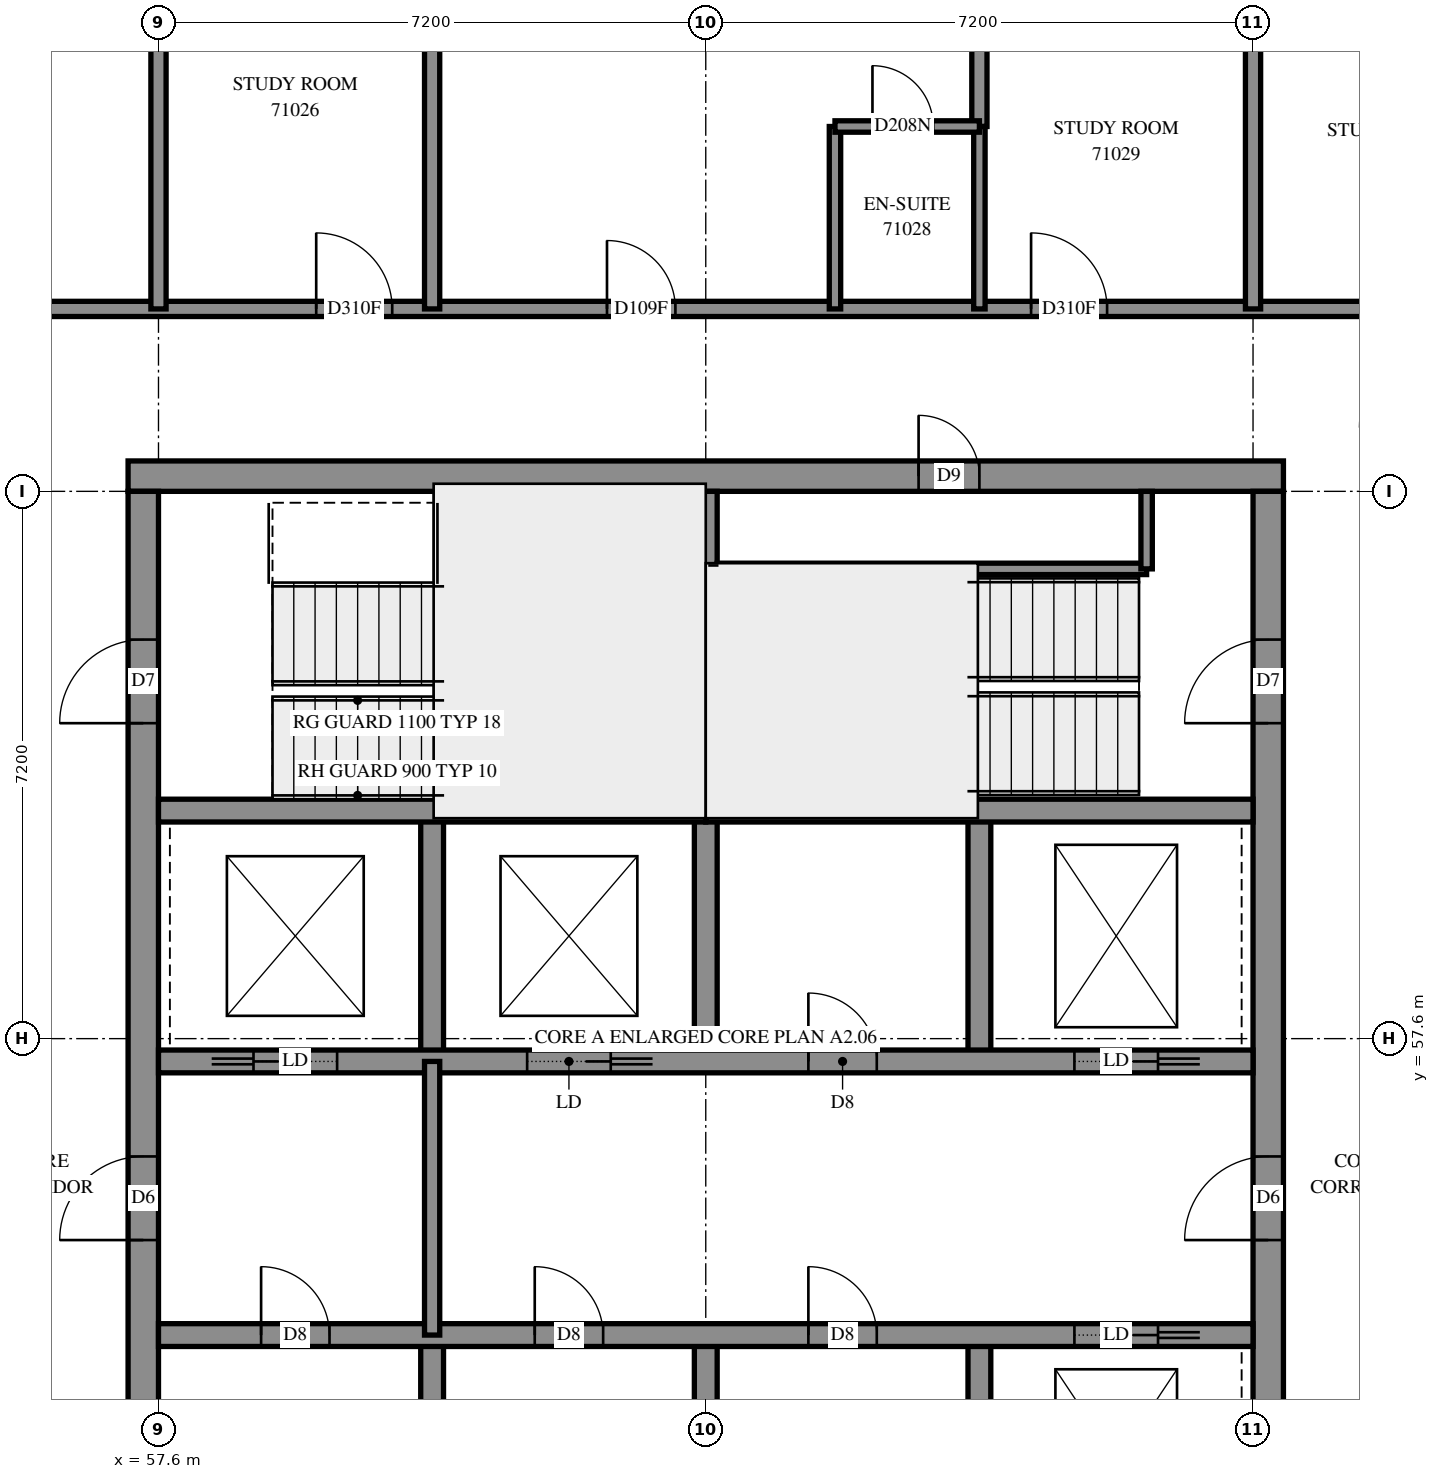
"""IFC4 building model, lengths in metres.
Left out: names, types, materials, properties, quantities, classifications, styles, units other than length and angle.
Written with IfcOpenShell. Run it as: python <this file> out.ifc"""

import sys

from ifc_helpers import new_model, si_unit, direction, frame, frame_2d, origin, place, context, subcontext, project, spatial, rectangle, extrude, element, fill, save


model = new_model("IFC4")
c1 = context("Model", 3, precision=1e-05, world=origin(), true_north=direction((0.0, 1.0)))
c2 = subcontext(c1, "Body", "Model", "MODEL_VIEW")
j1 = project(units=[si_unit("LENGTHUNIT", "METRE"), si_unit("PLANEANGLEUNIT", "RADIAN")], contexts=[c1])
p1 = place(None, origin())
s1 = spatial("IfcSite", under=j1, at=p1, CompositionType="ELEMENT")
p2 = place(p1, origin())
s2 = spatial("IfcBuilding", under=s1, at=p2, CompositionType="ELEMENT")
p3 = place(p2, frame((0.0, 0.0, 260.8)))
s3 = spatial("IfcBuildingStorey", under=s2, at=p3, CompositionType="ELEMENT", Elevation=260.8)
p4 = place(p3, frame((57.2, 65.0, -0.3), z_axis=(0.0, 0.0, 1.0), x_axis=(1.0, 0.0, 0.0)))
e1 = element("IfcWall", 1, at=p4, inside=s3, PredefinedType="SHEAR", context=c2, shape_type="SweptSolid", body=[
    extrude(rectangle(XDim=15.2, YDim=0.4, at=frame_2d((7.6, 0.0))), origin(), (0.0, 0.0, 1.0), 2.7),
])
p5 = place(p4, frame((10.4, 0.0, 0.3)))
e2 = element("IfcOpeningElement", 2, at=p5, cuts=e1, PredefinedType="OPENING", context=c2, shape_type="SweptSolid", body=[
    extrude(rectangle(XDim=0.8, YDim=2.1, at=frame_2d((0.4, 1.05))), frame((0.0, 0.21, 0.0), z_axis=(0.0, -1.0, 0.0), x_axis=(1.0, 0.0, 0.0)), (0.0, 0.0, 1.0), 0.42),
])
p6 = place(p3, frame((57.4, 50.4, -0.3), z_axis=(0.0, 0.0, 1.0), x_axis=(0.0, 1.0, 0.0)))
e3 = element("IfcWall", 3, at=p6, inside=s3, PredefinedType="SHEAR", context=c2, shape_type="SweptSolid", body=[
    extrude(rectangle(XDim=14.4, YDim=0.4, at=frame_2d((7.2, 0.0))), origin(), (0.0, 0.0, 1.0), 2.7),
])
p7 = place(p6, frame((4.55, 0.0, 0.3)))
e4 = element("IfcOpeningElement", 4, at=p7, cuts=e3, PredefinedType="OPENING", context=c2, shape_type="SweptSolid", body=[
    extrude(rectangle(XDim=1.1, YDim=2.1, at=frame_2d((0.55, 1.05))), frame((0.0, 0.21, 0.0), z_axis=(0.0, -1.0, 0.0), x_axis=(1.0, 0.0, 0.0)), (0.0, 0.0, 1.0), 0.42),
])
p8 = place(p6, frame((11.35, 0.0, 0.3)))
e5 = element("IfcOpeningElement", 5, at=p8, cuts=e3, PredefinedType="OPENING", context=c2, shape_type="SweptSolid", body=[
    extrude(rectangle(XDim=1.1, YDim=2.1, at=frame_2d((0.55, 1.05))), frame((0.0, 0.21, 0.0), z_axis=(0.0, -1.0, 0.0), x_axis=(1.0, 0.0, 0.0)), (0.0, 0.0, 1.0), 0.42),
])
p9 = place(p3, frame((72.2, 50.4, -0.3), z_axis=(0.0, 0.0, 1.0), x_axis=(0.0, 1.0, 0.0)))
e6 = element("IfcWall", 6, at=p9, inside=s3, PredefinedType="SHEAR", context=c2, shape_type="SweptSolid", body=[
    extrude(rectangle(XDim=14.4, YDim=0.4, at=frame_2d((7.2, 0.0))), origin(), (0.0, 0.0, 1.0), 2.7),
])
p10 = place(p9, frame((4.55, 0.0, 0.3)))
e7 = element("IfcOpeningElement", 7, at=p10, cuts=e6, PredefinedType="OPENING", context=c2, shape_type="SweptSolid", body=[
    extrude(rectangle(XDim=1.1, YDim=2.1, at=frame_2d((0.55, 1.05))), frame((0.0, 0.21, 0.0), z_axis=(0.0, -1.0, 0.0), x_axis=(1.0, 0.0, 0.0)), (0.0, 0.0, 1.0), 0.42),
])
p11 = place(p9, frame((11.35, 0.0, 0.3)))
e8 = element("IfcOpeningElement", 8, at=p11, cuts=e6, PredefinedType="OPENING", context=c2, shape_type="SweptSolid", body=[
    extrude(rectangle(XDim=1.1, YDim=2.1, at=frame_2d((0.55, 1.05))), frame((0.0, 0.21, 0.0), z_axis=(0.0, -1.0, 0.0), x_axis=(1.0, 0.0, 0.0)), (0.0, 0.0, 1.0), 0.42),
])
for number, where, z_axis, x_axis in (
    (9, (61.2, 50.4, 0.0), (0.0, 0.0, 1.0), (0.0, 1.0, 0.0)),
    (10, (61.2, 57.3, 0.0), (0.0, 0.0, 1.0), (0.0, 1.0, 0.0)),
    (11, (64.8, 50.4, 0.0), (0.0, 0.0, 1.0), (0.0, 1.0, 0.0)),
    (12, (64.8, 57.3, 0.0), (0.0, 0.0, 1.0), (0.0, 1.0, 0.0)),
    (13, (68.4, 50.4, 0.0), (0.0, 0.0, 1.0), (0.0, 1.0, 0.0)),
    (14, (68.4, 57.3, 0.0), (0.0, 0.0, 1.0), (0.0, 1.0, 0.0)),
):
    element("IfcWall", number, at=place(p3, frame(where, z_axis=z_axis, x_axis=x_axis)), inside=s3, PredefinedType="SOLIDWALL", context=c2, shape_type="SweptSolid", body=[
        extrude(rectangle(XDim=3.3, YDim=0.3, at=frame_2d((1.65, 0.0))), origin(), (0.0, 0.0, 1.0), 3.1),
    ])
p12 = place(p3, frame((57.6, 53.7, 0.0), z_axis=(0.0, 0.0, 1.0), x_axis=(1.0, 0.0, 0.0)))
e15 = element("IfcWall", 15, at=p12, inside=s3, PredefinedType="SOLIDWALL", context=c2, shape_type="SweptSolid", body=[
    extrude(rectangle(XDim=14.4, YDim=0.3, at=frame_2d((7.2, 0.0))), origin(), (0.0, 0.0, 1.0), 3.1),
])
p13 = place(p12, frame((1.35, 0.0, 0.0)))
e16 = element("IfcOpeningElement", 16, at=p13, cuts=e15, PredefinedType="OPENING", context=c2, shape_type="SweptSolid", body=[
    extrude(rectangle(XDim=0.9, YDim=2.1, at=frame_2d((0.45, 1.05))), frame((0.0, 0.16, 0.0), z_axis=(0.0, -1.0, 0.0), x_axis=(1.0, 0.0, 0.0)), (0.0, 0.0, 1.0), 0.32),
])
p14 = place(p12, frame((4.95, 0.0, 0.0)))
e17 = element("IfcOpeningElement", 17, at=p14, cuts=e15, PredefinedType="OPENING", context=c2, shape_type="SweptSolid", body=[
    extrude(rectangle(XDim=0.9, YDim=2.1, at=frame_2d((0.45, 1.05))), frame((0.0, 0.16, 0.0), z_axis=(0.0, -1.0, 0.0), x_axis=(1.0, 0.0, 0.0)), (0.0, 0.0, 1.0), 0.32),
])
p15 = place(p12, frame((8.55, 0.0, 0.0)))
e18 = element("IfcOpeningElement", 18, at=p15, cuts=e15, PredefinedType="OPENING", context=c2, shape_type="SweptSolid", body=[
    extrude(rectangle(XDim=0.9, YDim=2.1, at=frame_2d((0.45, 1.05))), frame((0.0, 0.16, 0.0), z_axis=(0.0, -1.0, 0.0), x_axis=(1.0, 0.0, 0.0)), (0.0, 0.0, 1.0), 0.32),
])
p16 = place(p12, frame((12.05, 0.0, 0.0)))
e19 = element("IfcOpeningElement", 19, at=p16, cuts=e15, PredefinedType="OPENING", context=c2, shape_type="SweptSolid", body=[
    extrude(rectangle(XDim=1.1, YDim=2.1, at=frame_2d((0.55, 1.05))), frame((0.0, 0.16, 0.0), z_axis=(0.0, -1.0, 0.0), x_axis=(1.0, 0.0, 0.0)), (0.0, 0.0, 1.0), 0.32),
])
p17 = place(p3, frame((57.6, 57.3, 0.0), z_axis=(0.0, 0.0, 1.0), x_axis=(1.0, 0.0, 0.0)))
e20 = element("IfcWall", 20, at=p17, inside=s3, PredefinedType="SOLIDWALL", context=c2, shape_type="SweptSolid", body=[
    extrude(rectangle(XDim=14.4, YDim=0.3, at=frame_2d((7.2, 0.0))), origin(), (0.0, 0.0, 1.0), 3.1),
])
p18 = place(p17, frame((8.55, 0.0, 0.0)))
e21 = element("IfcOpeningElement", 21, at=p18, cuts=e20, PredefinedType="OPENING", context=c2, shape_type="SweptSolid", body=[
    extrude(rectangle(XDim=0.9, YDim=2.1, at=frame_2d((0.45, 1.05))), frame((0.0, 0.16, 0.0), z_axis=(0.0, -1.0, 0.0), x_axis=(1.0, 0.0, 0.0)), (0.0, 0.0, 1.0), 0.32),
])
p19 = place(p17, frame((1.25, 0.0, 0.0)))
e22 = element("IfcOpeningElement", 22, at=p19, cuts=e20, PredefinedType="OPENING", context=c2, shape_type="SweptSolid", body=[
    extrude(rectangle(XDim=1.1, YDim=2.1, at=frame_2d((0.55, 1.05))), frame((0.0, 0.16, 0.0), z_axis=(0.0, -1.0, 0.0), x_axis=(1.0, 0.0, 0.0)), (0.0, 0.0, 1.0), 0.32),
])
p20 = place(p17, frame((4.85, 0.0, 0.0)))
e23 = element("IfcOpeningElement", 23, at=p20, cuts=e20, PredefinedType="OPENING", context=c2, shape_type="SweptSolid", body=[
    extrude(rectangle(XDim=1.1, YDim=2.1, at=frame_2d((0.55, 1.05))), frame((0.0, 0.16, 0.0), z_axis=(0.0, -1.0, 0.0), x_axis=(1.0, 0.0, 0.0)), (0.0, 0.0, 1.0), 0.32),
])
p21 = place(p17, frame((12.05, 0.0, 0.0)))
e24 = element("IfcOpeningElement", 24, at=p21, cuts=e20, PredefinedType="OPENING", context=c2, shape_type="SweptSolid", body=[
    extrude(rectangle(XDim=1.1, YDim=2.1, at=frame_2d((0.55, 1.05))), frame((0.0, 0.16, 0.0), z_axis=(0.0, -1.0, 0.0), x_axis=(1.0, 0.0, 0.0)), (0.0, 0.0, 1.0), 0.32),
])
for number, where, z_axis, x_axis in (
    (25, (57.6, 60.6, 0.0), (0.0, 0.0, 1.0), (1.0, 0.0, 0.0)),
    (26, (64.8, 60.6, 0.0), (0.0, 0.0, 1.0), (1.0, 0.0, 0.0)),
):
    element("IfcWall", number, at=place(p3, frame(where, z_axis=z_axis, x_axis=x_axis)), inside=s3, PredefinedType="SOLIDWALL", context=c2, shape_type="SweptSolid", body=[
        extrude(rectangle(XDim=7.2, YDim=0.3, at=frame_2d((3.6, 0.0))), origin(), (0.0, 0.0, 1.0), 3.1),
    ])
p22 = place(p3, frame((64.8, 60.6, 0.0), z_axis=(0.0, 0.0, 1.0), x_axis=(0.0, 1.0, 0.0)))
e27 = element("IfcWall", 27, at=p22, inside=s3, PredefinedType="SOLIDWALL", context=c2, shape_type="SweptSolid", body=[
    extrude(rectangle(XDim=4.2, YDim=0.3, at=frame_2d((2.1, 0.0))), origin(), (0.0, 0.0, 1.0), 3.1),
])
p23 = place(p3, frame((64.95, 63.78, 0.0), z_axis=(0.0, 0.0, 1.0), x_axis=(1.0, 0.0, 0.0)))
e28 = element("IfcWall", 28, at=p23, inside=s3, PredefinedType="PARTITIONING", context=c2, shape_type="SweptSolid", body=[
    extrude(rectangle(XDim=5.65, YDim=0.15, at=frame_2d((2.825, 0.0))), origin(), (0.0, 0.0, 1.0), 3.1),
])
p24 = place(p3, frame((70.6, 63.78, 0.0), z_axis=(0.0, 0.0, 1.0), x_axis=(0.0, 1.0, 0.0)))
e29 = element("IfcWall", 29, at=p24, inside=s3, PredefinedType="PARTITIONING", context=c2, shape_type="SweptSolid", body=[
    extrude(rectangle(XDim=1.02, YDim=0.15, at=frame_2d((0.51, 0.0))), origin(), (0.0, 0.0, 1.0), 3.1),
])
p25 = place(p3, frame((61.2, 53.7, 0.0), z_axis=(0.0, 0.0, 1.0), x_axis=(0.0, 1.0, 0.0)))
e30 = element("IfcWall", 30, at=p25, inside=s3, PredefinedType="PARTITIONING", context=c2, shape_type="SweptSolid", body=[
    extrude(rectangle(XDim=3.6, YDim=0.2, at=frame_2d((1.8, 0.0))), origin(), (0.0, 0.0, 1.0), 3.1),
])
p26 = place(p3, frame((55.2, 67.2, 0.0), z_axis=(0.0, 0.0, 1.0), x_axis=(1.0, 0.0, 0.0)))
e31 = element("IfcWall", 31, at=p26, inside=s3, PredefinedType="PARTITIONING", context=c2, shape_type="SweptSolid", body=[
    extrude(rectangle(XDim=19.2, YDim=0.2, at=frame_2d((9.6, 0.0))), origin(), (0.0, 0.0, 1.0), 3.1),
])
p27 = place(p26, frame((4.475, 0.0, 0.0)))
e32 = element("IfcOpeningElement", 32, at=p27, cuts=e31, PredefinedType="OPENING", context=c2, shape_type="SweptSolid", body=[
    extrude(rectangle(XDim=1.0, YDim=2.1, at=frame_2d((0.5, 1.05))), frame((0.0, 0.11, 0.0), z_axis=(0.0, -1.0, 0.0), x_axis=(1.0, 0.0, 0.0)), (0.0, 0.0, 1.0), 0.22),
])
p28 = place(p26, frame((8.301, 0.0, 0.0)))
e33 = element("IfcOpeningElement", 33, at=p28, cuts=e31, PredefinedType="OPENING", context=c2, shape_type="SweptSolid", body=[
    extrude(rectangle(XDim=0.9, YDim=2.1, at=frame_2d((0.45, 1.05))), frame((0.0, 0.11, 0.0), z_axis=(0.0, -1.0, 0.0), x_axis=(1.0, 0.0, 0.0)), (0.0, 0.0, 1.0), 0.22),
])
p29 = place(p26, frame((13.88, 0.0, 0.0)))
e34 = element("IfcOpeningElement", 34, at=p29, cuts=e31, PredefinedType="OPENING", context=c2, shape_type="SweptSolid", body=[
    extrude(rectangle(XDim=1.0, YDim=2.1, at=frame_2d((0.5, 1.05))), frame((0.0, 0.11, 0.0), z_axis=(0.0, -1.0, 0.0), x_axis=(1.0, 0.0, 0.0)), (0.0, 0.0, 1.0), 0.22),
])
p30 = place(p3, frame((61.2, 67.2, 0.0), z_axis=(0.0, 0.0, 1.0), x_axis=(0.0, 1.0, 0.0)))
e35 = element("IfcWall", 35, at=p30, inside=s3, PredefinedType="PARTITIONING", context=c2, shape_type="SweptSolid", body=[
    extrude(rectangle(XDim=5.571, YDim=0.2, at=frame_2d((2.785, 0.0))), origin(), (0.0, 0.0, 1.0), 3.1),
])
p31 = place(p3, frame((57.6, 67.2, 0.0), z_axis=(0.0, 0.0, 1.0), x_axis=(0.0, 1.0, 0.0)))
e36 = element("IfcWall", 36, at=p31, inside=s3, PredefinedType="PARTITIONING", context=c2, shape_type="SweptSolid", body=[
    extrude(rectangle(XDim=4.45, YDim=0.2, at=frame_2d((2.225, 0.0))), origin(), (0.0, 0.0, 1.0), 3.1),
])
p32 = place(p3, frame((72.0, 67.2, 0.0), z_axis=(0.0, 0.0, 1.0), x_axis=(0.0, 1.0, 0.0)))
e37 = element("IfcWall", 37, at=p32, inside=s3, PredefinedType="PARTITIONING", context=c2, shape_type="SweptSolid", body=[
    extrude(rectangle(XDim=4.346, YDim=0.2, at=frame_2d((2.173, 0.0))), origin(), (0.0, 0.0, 1.0), 3.1),
])
p33 = place(p3, frame((68.4, 69.6, 0.0), z_axis=(0.0, 0.0, 1.0), x_axis=(0.0, 1.0, 0.0)))
e38 = element("IfcWall", 38, at=p33, inside=s3, PredefinedType="PARTITIONING", context=c2, shape_type="SweptSolid", body=[
    extrude(rectangle(XDim=3.176, YDim=0.2, at=frame_2d((1.588, 0.0))), origin(), (0.0, 0.0, 1.0), 3.1),
])
for number, where, z_axis, x_axis in (
    (39, (66.5, 67.2, 0.0), (0.0, 0.0, 1.0), (0.0, 1.0, 0.0)),
    (40, (68.4, 67.2, 0.0), (0.0, 0.0, 1.0), (0.0, 1.0, 0.0)),
):
    element("IfcWall", number, at=place(p3, frame(where, z_axis=z_axis, x_axis=x_axis)), inside=s3, PredefinedType="PARTITIONING", context=c2, shape_type="SweptSolid", body=[
        extrude(rectangle(XDim=2.4, YDim=0.15, at=frame_2d((1.2, 0.0))), origin(), (0.0, 0.0, 1.0), 3.1),
    ])
p34 = place(p3, frame((66.5, 69.6, 0.0), z_axis=(0.0, 0.0, 1.0), x_axis=(1.0, 0.0, 0.0)))
e41 = element("IfcWall", 41, at=p34, inside=s3, PredefinedType="PARTITIONING", context=c2, shape_type="SweptSolid", body=[
    extrude(rectangle(XDim=1.9, YDim=0.15, at=frame_2d((0.95, 0.0))), origin(), (0.0, 0.0, 1.0), 3.1),
])
p35 = place(p34, frame((0.493, 0.0, 0.0)))
e42 = element("IfcOpeningElement", 42, at=p35, cuts=e41, PredefinedType="OPENING", context=c2, shape_type="SweptSolid", body=[
    extrude(rectangle(XDim=0.8, YDim=2.1, at=frame_2d((0.4, 1.05))), frame((0.0, 0.085, 0.0), z_axis=(0.0, -1.0, 0.0), x_axis=(1.0, 0.0, 0.0)), (0.0, 0.0, 1.0), 0.17),
])
p36 = place(p5, origin())
e43 = element("IfcDoor", 43, at=p36, inside=s3, OperationType="SINGLE_SWING_RIGHT", PredefinedType="DOOR", context=c2, shape_type="SweptSolid", body=[
    extrude(rectangle(XDim=0.8, YDim=2.1, at=frame_2d((0.4, 1.05))), frame((0.0, 0.025, 0.0), z_axis=(0.0, -1.0, 0.0), x_axis=(1.0, 0.0, 0.0)), (0.0, 0.0, 1.0), 0.05),
])
fill(e2, e43)
p37 = place(p7, origin())
e44 = element("IfcDoor", 44, at=p37, inside=s3, OperationType="DOUBLE_DOOR_SINGLE_SWING", PredefinedType="DOOR", context=c2, shape_type="SweptSolid", body=[
    extrude(rectangle(XDim=1.1, YDim=2.1, at=frame_2d((0.55, 1.05))), frame((0.0, 0.025, 0.0), z_axis=(0.0, -1.0, 0.0), x_axis=(1.0, 0.0, 0.0)), (0.0, 0.0, 1.0), 0.05),
])
fill(e4, e44)
p38 = place(p10, origin())
e45 = element("IfcDoor", 45, at=p38, inside=s3, OperationType="DOUBLE_DOOR_SINGLE_SWING", PredefinedType="DOOR", context=c2, shape_type="SweptSolid", body=[
    extrude(rectangle(XDim=1.1, YDim=2.1, at=frame_2d((0.55, 1.05))), frame((0.0, 0.025, 0.0), z_axis=(0.0, -1.0, 0.0), x_axis=(1.0, 0.0, 0.0)), (0.0, 0.0, 1.0), 0.05),
])
fill(e7, e45)
p39 = place(p8, origin())
e46 = element("IfcDoor", 46, at=p39, inside=s3, OperationType="SINGLE_SWING_LEFT", PredefinedType="DOOR", context=c2, shape_type="SweptSolid", body=[
    extrude(rectangle(XDim=1.1, YDim=2.1, at=frame_2d((0.55, 1.05))), frame((0.0, 0.025, 0.0), z_axis=(0.0, -1.0, 0.0), x_axis=(1.0, 0.0, 0.0)), (0.0, 0.0, 1.0), 0.05),
])
fill(e5, e46)
p40 = place(p11, origin())
e47 = element("IfcDoor", 47, at=p40, inside=s3, OperationType="SINGLE_SWING_RIGHT", PredefinedType="DOOR", context=c2, shape_type="SweptSolid", body=[
    extrude(rectangle(XDim=1.1, YDim=2.1, at=frame_2d((0.55, 1.05))), frame((0.0, 0.025, 0.0), z_axis=(0.0, -1.0, 0.0), x_axis=(1.0, 0.0, 0.0)), (0.0, 0.0, 1.0), 0.05),
])
fill(e8, e47)
p41 = place(p13, origin())
e48 = element("IfcDoor", 48, at=p41, inside=s3, OperationType="SINGLE_SWING_LEFT", PredefinedType="DOOR", context=c2, shape_type="SweptSolid", body=[
    extrude(rectangle(XDim=0.9, YDim=2.1, at=frame_2d((0.45, 1.05))), frame((0.0, 0.025, 0.0), z_axis=(0.0, -1.0, 0.0), x_axis=(1.0, 0.0, 0.0)), (0.0, 0.0, 1.0), 0.05),
])
fill(e16, e48)
p42 = place(p14, origin())
e49 = element("IfcDoor", 49, at=p42, inside=s3, OperationType="SINGLE_SWING_LEFT", PredefinedType="DOOR", context=c2, shape_type="SweptSolid", body=[
    extrude(rectangle(XDim=0.9, YDim=2.1, at=frame_2d((0.45, 1.05))), frame((0.0, 0.025, 0.0), z_axis=(0.0, -1.0, 0.0), x_axis=(1.0, 0.0, 0.0)), (0.0, 0.0, 1.0), 0.05),
])
fill(e17, e49)
p43 = place(p15, origin())
e50 = element("IfcDoor", 50, at=p43, inside=s3, OperationType="SINGLE_SWING_LEFT", PredefinedType="DOOR", context=c2, shape_type="SweptSolid", body=[
    extrude(rectangle(XDim=0.9, YDim=2.1, at=frame_2d((0.45, 1.05))), frame((0.0, 0.025, 0.0), z_axis=(0.0, -1.0, 0.0), x_axis=(1.0, 0.0, 0.0)), (0.0, 0.0, 1.0), 0.05),
])
fill(e18, e50)
p44 = place(p18, origin())
e51 = element("IfcDoor", 51, at=p44, inside=s3, OperationType="SINGLE_SWING_LEFT", PredefinedType="DOOR", context=c2, shape_type="SweptSolid", body=[
    extrude(rectangle(XDim=0.9, YDim=2.1, at=frame_2d((0.45, 1.05))), frame((0.0, 0.025, 0.0), z_axis=(0.0, -1.0, 0.0), x_axis=(1.0, 0.0, 0.0)), (0.0, 0.0, 1.0), 0.05),
])
fill(e21, e51)
p45 = place(p16, origin())
e52 = element("IfcDoor", 52, at=p45, inside=s3, OperationType="SLIDING_TO_RIGHT", PredefinedType="DOOR", context=c2, shape_type="SweptSolid", body=[
    extrude(rectangle(XDim=1.1, YDim=2.1, at=frame_2d((0.55, 1.05))), frame((0.0, 0.025, 0.0), z_axis=(0.0, -1.0, 0.0), x_axis=(1.0, 0.0, 0.0)), (0.0, 0.0, 1.0), 0.05),
])
fill(e19, e52)
p46 = place(p19, origin())
e53 = element("IfcDoor", 53, at=p46, inside=s3, OperationType="SLIDING_TO_LEFT", PredefinedType="DOOR", context=c2, shape_type="SweptSolid", body=[
    extrude(rectangle(XDim=1.1, YDim=2.1, at=frame_2d((0.55, 1.05))), frame((0.0, 0.025, 0.0), z_axis=(0.0, -1.0, 0.0), x_axis=(1.0, 0.0, 0.0)), (0.0, 0.0, 1.0), 0.05),
])
fill(e22, e53)
p47 = place(p20, origin())
e54 = element("IfcDoor", 54, at=p47, inside=s3, OperationType="SLIDING_TO_RIGHT", PredefinedType="DOOR", context=c2, shape_type="SweptSolid", body=[
    extrude(rectangle(XDim=1.1, YDim=2.1, at=frame_2d((0.55, 1.05))), frame((0.0, 0.025, 0.0), z_axis=(0.0, -1.0, 0.0), x_axis=(1.0, 0.0, 0.0)), (0.0, 0.0, 1.0), 0.05),
])
fill(e23, e54)
p48 = place(p21, origin())
e55 = element("IfcDoor", 55, at=p48, inside=s3, OperationType="SLIDING_TO_RIGHT", PredefinedType="DOOR", context=c2, shape_type="SweptSolid", body=[
    extrude(rectangle(XDim=1.1, YDim=2.1, at=frame_2d((0.55, 1.05))), frame((0.0, 0.025, 0.0), z_axis=(0.0, -1.0, 0.0), x_axis=(1.0, 0.0, 0.0)), (0.0, 0.0, 1.0), 0.05),
])
fill(e24, e55)
p49 = place(p27, origin())
e56 = element("IfcDoor", 56, at=p49, inside=s3, OperationType="SINGLE_SWING_RIGHT", PredefinedType="DOOR", context=c2, shape_type="SweptSolid", body=[
    extrude(rectangle(XDim=1.0, YDim=2.1, at=frame_2d((0.5, 1.05))), frame((0.0, 0.025, 0.0), z_axis=(0.0, -1.0, 0.0), x_axis=(1.0, 0.0, 0.0)), (0.0, 0.0, 1.0), 0.05),
])
fill(e32, e56)
p50 = place(p28, origin())
e57 = element("IfcDoor", 57, at=p50, inside=s3, OperationType="SINGLE_SWING_LEFT", PredefinedType="DOOR", context=c2, shape_type="SweptSolid", body=[
    extrude(rectangle(XDim=0.9, YDim=2.1, at=frame_2d((0.45, 1.05))), frame((0.0, 0.025, 0.0), z_axis=(0.0, -1.0, 0.0), x_axis=(1.0, 0.0, 0.0)), (0.0, 0.0, 1.0), 0.05),
])
fill(e33, e57)
p51 = place(p35, origin())
e58 = element("IfcDoor", 58, at=p51, inside=s3, OperationType="SINGLE_SWING_RIGHT", PredefinedType="DOOR", context=c2, shape_type="SweptSolid", body=[
    extrude(rectangle(XDim=0.8, YDim=2.1, at=frame_2d((0.4, 1.05))), frame((0.0, 0.025, 0.0), z_axis=(0.0, -1.0, 0.0), x_axis=(1.0, 0.0, 0.0)), (0.0, 0.0, 1.0), 0.05),
])
fill(e42, e58)
p52 = place(p29, origin())
e59 = element("IfcDoor", 59, at=p52, inside=s3, OperationType="SINGLE_SWING_LEFT", PredefinedType="DOOR", context=c2, shape_type="SweptSolid", body=[
    extrude(rectangle(XDim=1.0, YDim=2.1, at=frame_2d((0.5, 1.05))), frame((0.0, 0.025, 0.0), z_axis=(0.0, -1.0, 0.0), x_axis=(1.0, 0.0, 0.0)), (0.0, 0.0, 1.0), 0.05),
])
fill(e34, e59)
save(model, sys.argv[1])
